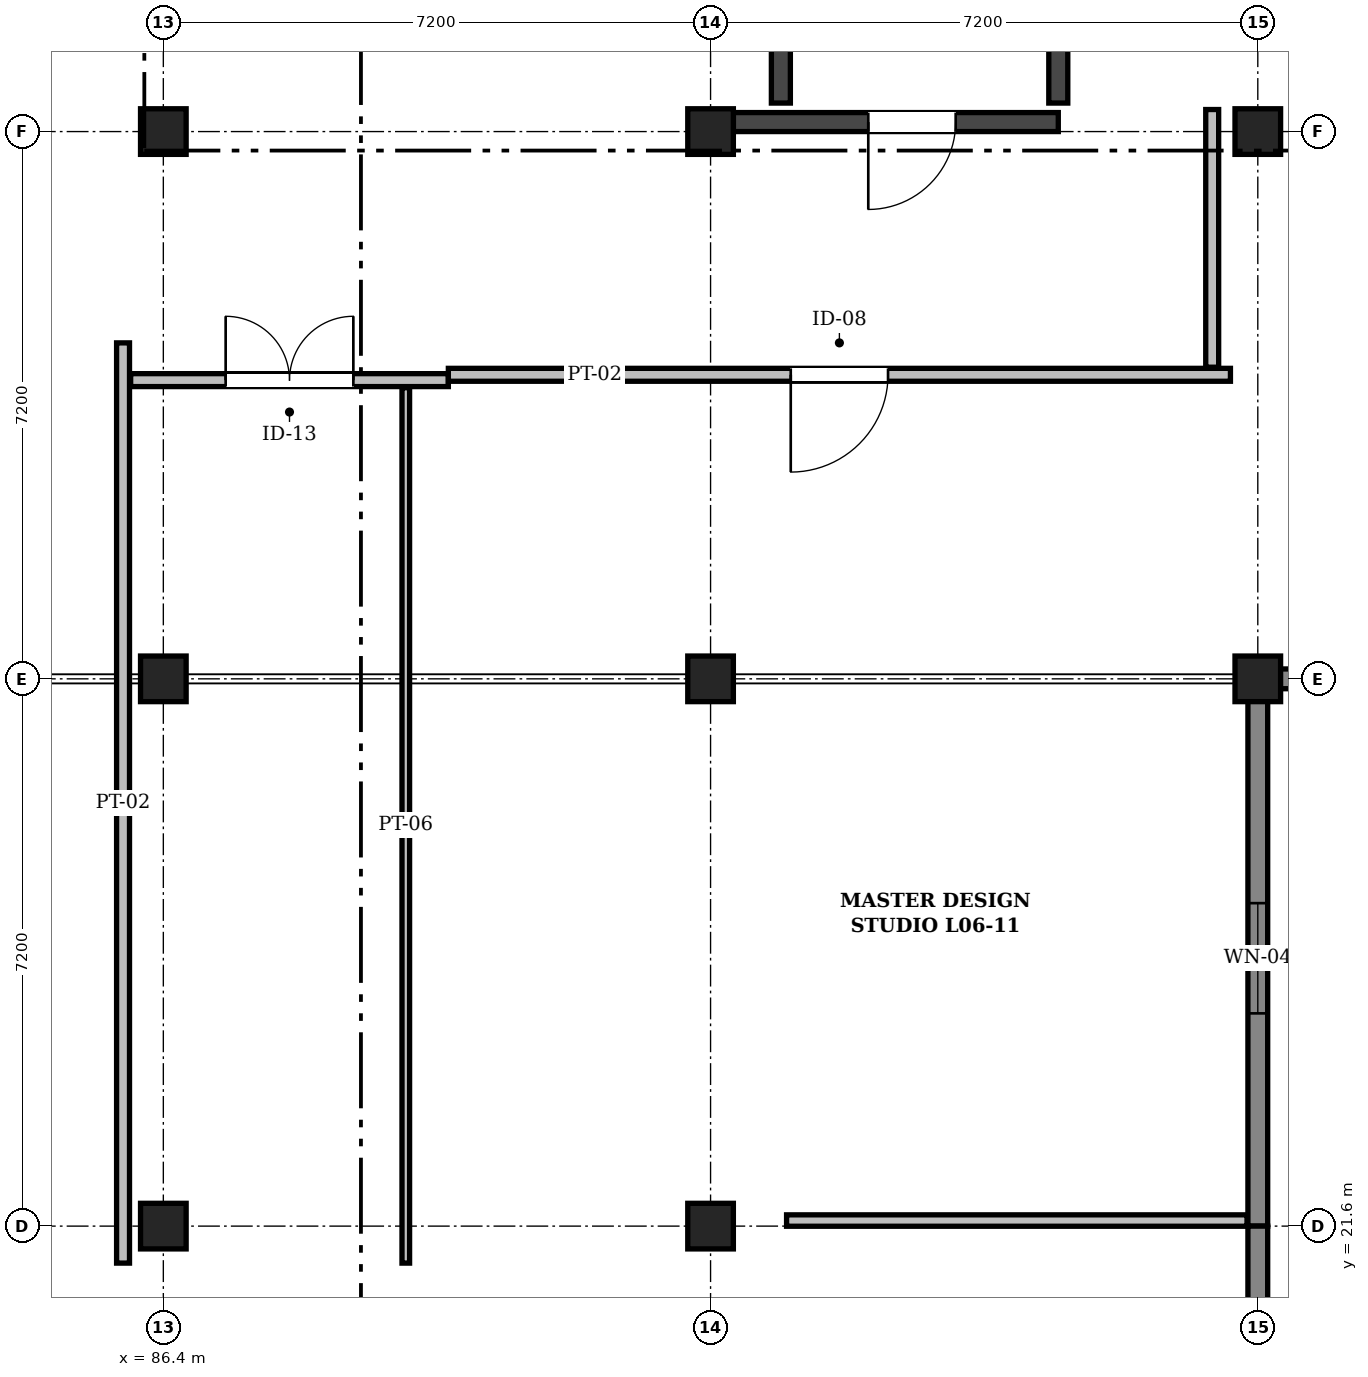
"""IFC4 building model, lengths in metres.
Left out: names, types, materials, properties, quantities, classifications, styles, units other than length and angle.
Written with IfcOpenShell. Run it as: python <this file> out.ifc"""

import sys

from ifc_helpers import new_model, si_unit, direction, frame, frame_2d, origin, origin_2d, place, context, subcontext, project, spatial, rectangle, extrude, element, fill, save


model = new_model("IFC4")
c1 = context("Model", 3, precision=1e-05, world=origin(), true_north=direction((0.0, 1.0)))
c2 = subcontext(c1, "Body", "Model", "MODEL_VIEW")
j1 = project(units=[si_unit("LENGTHUNIT", "METRE"), si_unit("PLANEANGLEUNIT", "RADIAN")], contexts=[c1])
p1 = place(None, origin())
s1 = spatial("IfcSite", under=j1, at=p1, CompositionType="ELEMENT")
p2 = place(p1, origin())
s2 = spatial("IfcBuilding", under=s1, at=p2, CompositionType="ELEMENT")
p3 = place(p2, frame((0.0, 0.0, 27.9)))
s3 = spatial("IfcBuildingStorey", under=s2, at=p3, CompositionType="ELEMENT", Elevation=27.9)
for number, where, z_axis, x_axis in (
    (1, (86.4, 21.6, 0.0), (0.0, 0.0, 1.0), (1.0, 0.0, 0.0)),
    (2, (86.4, 28.8, 0.0), (0.0, 0.0, 1.0), (1.0, 0.0, 0.0)),
    (3, (86.4, 36.0, 0.0), (0.0, 0.0, 1.0), (1.0, 0.0, 0.0)),
    (4, (93.6, 21.6, 0.0), (0.0, 0.0, 1.0), (1.0, 0.0, 0.0)),
    (5, (93.6, 28.8, 0.0), (0.0, 0.0, 1.0), (1.0, 0.0, 0.0)),
    (6, (93.6, 36.0, 0.0), (0.0, 0.0, 1.0), (1.0, 0.0, 0.0)),
    (7, (100.8, 28.8, 0.0), (0.0, 0.0, 1.0), (1.0, 0.0, 0.0)),
    (8, (100.8, 36.0, 0.0), (0.0, 0.0, 1.0), (1.0, 0.0, 0.0)),
):
    element("IfcColumn", number, at=place(p3, frame(where, z_axis=z_axis, x_axis=x_axis)), inside=s3, PredefinedType="COLUMN", context=c2, shape_type="SweptSolid", body=[
        extrude(rectangle(XDim=0.6, YDim=0.6, at=origin_2d()), origin(), (0.0, 0.0, 1.0), 4.5),
    ])
p4 = place(p3, frame((104.55, 28.8, 0.0), z_axis=(0.0, 0.0, 1.0), x_axis=(-1.0, 0.0, 0.0)))
e9 = element("IfcWall", 9, at=p4, inside=s3, PredefinedType="SOLIDWALL", context=c2, shape_type="SweptSolid", body=[
    extrude(rectangle(XDim=3.9, YDim=0.26, at=frame_2d((1.95, 0.0))), origin(), (0.0, 0.0, 1.0), 4.22),
])
p5 = place(p3, frame((100.8, 28.648, 0.0), z_axis=(0.0, 0.0, 1.0), x_axis=(0.0, -1.0, 0.0)))
e10 = element("IfcWall", 10, at=p5, inside=s3, PredefinedType="SOLIDWALL", context=c2, shape_type="SweptSolid", body=[
    extrude(rectangle(XDim=7.048, YDim=0.26, at=frame_2d((3.524, 0.0))), origin(), (0.0, 0.0, 1.0), 4.22),
])
p6 = place(p5, frame((2.799, 0.0, 0.95)))
e11 = element("IfcOpeningElement", 11, at=p6, cuts=e10, PredefinedType="OPENING", context=c2, shape_type="SweptSolid", body=[
    extrude(rectangle(XDim=1.45, YDim=1.3, at=frame_2d((0.725, 0.65))), frame((0.0, 0.142, 0.0), z_axis=(0.0, -1.0, 0.0), x_axis=(1.0, 0.0, 0.0)), (0.0, 0.0, 1.0), 0.284),
])
p7 = place(p3, frame((100.8, 21.6, 0.0), z_axis=(0.0, 0.0, 1.0), x_axis=(0.0, -1.0, 0.0)))
e12 = element("IfcWall", 12, at=p7, inside=s3, PredefinedType="SOLIDWALL", context=c2, shape_type="SweptSolid", body=[
    extrude(rectangle(XDim=7.2, YDim=0.26, at=frame_2d((3.6, 0.0))), origin(), (0.0, 0.0, 1.0), 4.22),
])
p8 = place(p7, frame((4.46, 0.0, 0.95)))
e13 = element("IfcOpeningElement", 13, at=p8, cuts=e12, PredefinedType="OPENING", context=c2, shape_type="SweptSolid", body=[
    extrude(rectangle(XDim=1.6, YDim=1.3, at=frame_2d((0.8, 0.65))), frame((0.0, 0.142, 0.0), z_axis=(0.0, -1.0, 0.0), x_axis=(1.0, 0.0, 0.0)), (0.0, 0.0, 1.0), 0.284),
])
p9 = place(p3, frame((93.9, 36.125, 0.0), z_axis=(0.0, 0.0, 1.0), x_axis=(1.0, 0.0, 0.0)))
e14 = element("IfcWall", 14, at=p9, inside=s3, PredefinedType="SHEAR", context=c2, shape_type="SweptSolid", body=[
    extrude(rectangle(XDim=4.275, YDim=0.25, at=frame_2d((2.138, 0.0))), origin(), (0.0, 0.0, 1.0), 4.25),
])
p10 = place(p9, frame((1.775, 0.0, 0.0)))
e15 = element("IfcOpeningElement", 15, at=p10, cuts=e14, PredefinedType="OPENING", context=c2, shape_type="SweptSolid", body=[
    extrude(rectangle(XDim=1.15, YDim=2.15, at=frame_2d((0.575, 1.075))), frame((0.0, 0.137, 0.0), z_axis=(0.0, -1.0, 0.0), x_axis=(1.0, 0.0, 0.0)), (0.0, 0.0, 1.0), 0.274),
])
p11 = place(p3, frame((94.525, 36.375, 0.0), z_axis=(0.0, 0.0, 1.0), x_axis=(0.0, 1.0, 0.0)))
e16 = element("IfcWall", 16, at=p11, inside=s3, PredefinedType="SHEAR", context=c2, shape_type="SweptSolid", body=[
    extrude(rectangle(XDim=2.77, YDim=0.25, at=frame_2d((1.385, 0.0))), origin(), (0.0, 0.0, 1.0), 4.25),
])
p12 = place(p3, frame((98.175, 36.375, 0.0), z_axis=(0.0, 0.0, 1.0), x_axis=(0.0, 1.0, 0.0)))
e17 = element("IfcWall", 17, at=p12, inside=s3, PredefinedType="SHEAR", context=c2, shape_type="SweptSolid", body=[
    extrude(rectangle(XDim=3.225, YDim=0.25, at=frame_2d((1.613, 0.0))), origin(), (0.0, 0.0, 1.0), 4.25),
])
p13 = place(p3, frame((85.87, 21.113, 0.0), z_axis=(0.0, 0.0, 1.0), x_axis=(0.0, 1.0, 0.0)))
e18 = element("IfcWall", 18, at=p13, inside=s3, PredefinedType="PARTITIONING", context=c2, shape_type="SweptSolid", body=[
    extrude(rectangle(XDim=12.107, YDim=0.17, at=frame_2d((6.053, 0.0))), origin(), (0.0, 0.0, 1.0), 4.16),
])
p14 = place(p3, frame((85.97, 32.73, 0.0), z_axis=(0.0, 0.0, 1.0), x_axis=(1.0, 0.0, 0.0)))
e19 = element("IfcWall", 19, at=p14, inside=s3, PredefinedType="PARTITIONING", context=c2, shape_type="SweptSolid", body=[
    extrude(rectangle(XDim=4.18, YDim=0.17, at=frame_2d((2.09, 0.0))), origin(), (0.0, 0.0, 1.0), 4.16),
])
p15 = place(p14, frame((1.25, 0.0, 0.0)))
e20 = element("IfcOpeningElement", 20, at=p15, cuts=e19, PredefinedType="OPENING", context=c2, shape_type="SweptSolid", body=[
    extrude(rectangle(XDim=1.68, YDim=2.28, at=frame_2d((0.84, 1.14))), frame((0.0, 0.097, 0.0), z_axis=(0.0, -1.0, 0.0), x_axis=(1.0, 0.0, 0.0)), (0.0, 0.0, 1.0), 0.194),
])
p16 = place(p3, frame((90.15, 32.8, 0.0), z_axis=(0.0, 0.0, 1.0), x_axis=(1.0, 0.0, 0.0)))
e21 = element("IfcWall", 21, at=p16, inside=s3, PredefinedType="PARTITIONING", context=c2, shape_type="SweptSolid", body=[
    extrude(rectangle(XDim=10.29, YDim=0.17, at=frame_2d((5.145, 0.0))), origin(), (0.0, 0.0, 1.0), 4.16),
])
p17 = place(p16, frame((4.505, 0.0, 0.0)))
e22 = element("IfcOpeningElement", 22, at=p17, cuts=e21, PredefinedType="OPENING", context=c2, shape_type="SweptSolid", body=[
    extrude(rectangle(XDim=1.28, YDim=2.22, at=frame_2d((0.64, 1.11))), frame((0.0, 0.097, 0.0), z_axis=(0.0, -1.0, 0.0), x_axis=(1.0, 0.0, 0.0)), (0.0, 0.0, 1.0), 0.194),
])
p18 = place(p3, frame((100.2, 32.9, 0.0), z_axis=(0.0, 0.0, 1.0), x_axis=(0.0, 1.0, 0.0)))
e23 = element("IfcWall", 23, at=p18, inside=s3, PredefinedType="PARTITIONING", context=c2, shape_type="SweptSolid", body=[
    extrude(rectangle(XDim=3.39, YDim=0.17, at=frame_2d((1.695, 0.0))), origin(), (0.0, 0.0, 1.0), 4.16),
])
p19 = place(p3, frame((89.59, 21.113, 0.0), z_axis=(0.0, 0.0, 1.0), x_axis=(0.0, 1.0, 0.0)))
e24 = element("IfcWall", 24, at=p19, inside=s3, PredefinedType="PARTITIONING", context=c2, shape_type="SweptSolid", body=[
    extrude(rectangle(XDim=11.517, YDim=0.1, at=frame_2d((5.758, 0.0))), origin(), (0.0, 0.0, 1.0), 4.16),
])
p20 = place(p3, frame((94.6, 21.673, 0.0), z_axis=(0.0, 0.0, 1.0), x_axis=(1.0, 0.0, 0.0)))
e25 = element("IfcWall", 25, at=p20, inside=s3, PredefinedType="PARTITIONING", context=c2, shape_type="SweptSolid", body=[
    extrude(rectangle(XDim=6.058, YDim=0.15, at=frame_2d((3.029, 0.0))), origin(), (0.0, 0.0, 1.0), 4.16),
])
p21 = place(p6, origin())
e26 = element("IfcWindow", 26, at=p21, inside=s3, PartitioningType="SINGLE_PANEL", PredefinedType="WINDOW", context=c2, shape_type="SweptSolid", body=[
    extrude(rectangle(XDim=1.45, YDim=1.3, at=frame_2d((0.725, 0.65))), frame((0.0, 0.03, 0.0), z_axis=(0.0, -1.0, 0.0), x_axis=(1.0, 0.0, 0.0)), (0.0, 0.0, 1.0), 0.06),
])
fill(e11, e26)
p22 = place(p10, frame((1.15, 0.0, 0.0), z_axis=(0.0, 0.0, 1.0), x_axis=(-1.0, 0.0, 0.0)))
e27 = element("IfcDoor", 27, at=p22, inside=s3, OperationType="SINGLE_SWING_RIGHT", PredefinedType="DOOR", context=c2, shape_type="SweptSolid", body=[
    extrude(rectangle(XDim=1.15, YDim=2.15, at=frame_2d((0.575, 1.075))), frame((0.0, 0.025, 0.0), z_axis=(0.0, -1.0, 0.0), x_axis=(1.0, 0.0, 0.0)), (0.0, 0.0, 1.0), 0.05),
])
fill(e15, e27)
p23 = place(p17, frame((1.28, 0.0, 0.0), z_axis=(0.0, 0.0, 1.0), x_axis=(-1.0, 0.0, 0.0)))
e28 = element("IfcDoor", 28, at=p23, inside=s3, OperationType="SINGLE_SWING_RIGHT", PredefinedType="DOOR", context=c2, shape_type="SweptSolid", body=[
    extrude(rectangle(XDim=1.28, YDim=2.22, at=frame_2d((0.64, 1.11))), frame((0.0, 0.025, 0.0), z_axis=(0.0, -1.0, 0.0), x_axis=(1.0, 0.0, 0.0)), (0.0, 0.0, 1.0), 0.05),
])
fill(e22, e28)
p24 = place(p15, origin())
e29 = element("IfcDoor", 29, at=p24, inside=s3, OperationType="DOUBLE_DOOR_SINGLE_SWING", PredefinedType="DOOR", context=c2, shape_type="SweptSolid", body=[
    extrude(rectangle(XDim=1.68, YDim=2.28, at=frame_2d((0.84, 1.14))), frame((0.0, 0.025, 0.0), z_axis=(0.0, -1.0, 0.0), x_axis=(1.0, 0.0, 0.0)), (0.0, 0.0, 1.0), 0.05),
])
fill(e20, e29)
save(model, sys.argv[1])
